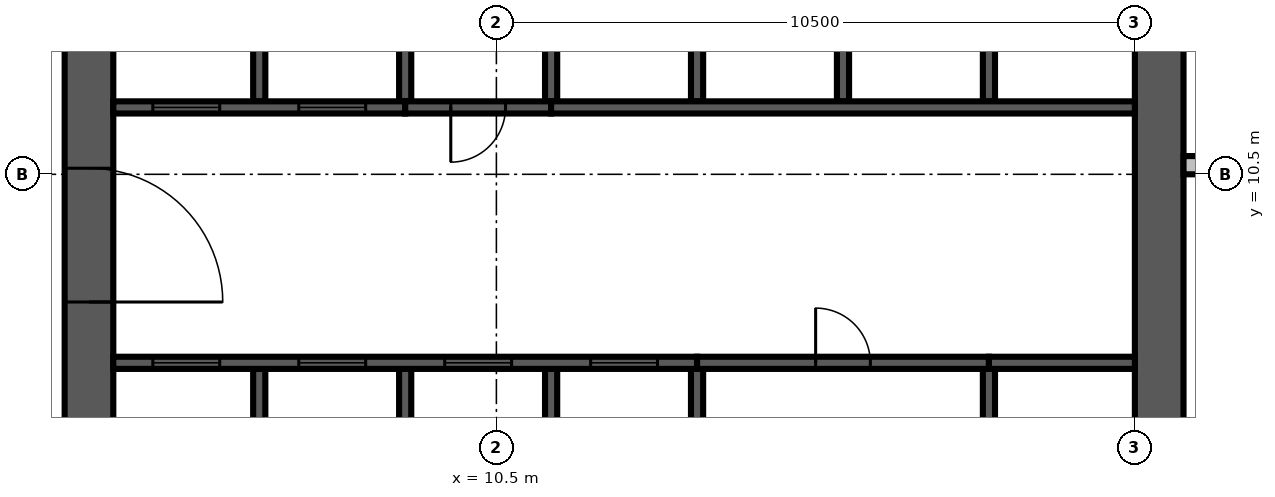
"""IFC4 building model, lengths in metres.
Left out: names, types, materials, properties, quantities, classifications, styles, units other than length and angle.
Written with IfcOpenShell. Run it as: python <this file> out.ifc"""

import sys

from ifc_helpers import new_model, si_unit, direction, frame, frame_2d, origin, place, context, subcontext, project, spatial, rectangle, extrude, source, transform, mapped, element, fill, save


model = new_model("IFC4")
c1 = context("Model", 3, precision=1e-05, world=origin(), true_north=direction((0.0, 1.0)))
c2 = subcontext(c1, "Body", "Model", "MODEL_VIEW")
j1 = project(units=[si_unit("LENGTHUNIT", "METRE"), si_unit("PLANEANGLEUNIT", "RADIAN")], contexts=[c1])
p1 = place(None, origin())
s1 = spatial("IfcSite", under=j1, at=p1, CompositionType="ELEMENT")
p2 = place(p1, origin())
s2 = spatial("IfcBuilding", under=s1, at=p2, CompositionType="ELEMENT")
p3 = place(p2, frame((0.0, 0.0, 212.0)))
s3 = spatial("IfcBuildingStorey", under=s2, at=p3, CompositionType="ELEMENT", Elevation=212.0)
m1 = source(origin(), c2, "Body", "SweptSolid", [
    extrude(rectangle(XDim=17.6, YDim=0.8, at=frame_2d((8.8, 0.0))), origin(), (0.0, 0.0, 1.0), 3.8),
])
p4 = place(p3, frame((3.8, 4.2, 0.0), z_axis=(0.0, 0.0, 1.0), x_axis=(0.0, 1.0, 0.0)))
e1 = element("IfcWall", 1, at=p4, inside=s3, PredefinedType="SHEAR", context=c2, shape_type="MappedRepresentation", body=[
    mapped(m1, transform((0.0, 0.0, 0.0), scale=1.0)),
])
m2 = source(origin(), c2, "Body", "SweptSolid", [
    extrude(rectangle(XDim=2.2, YDim=2.1, at=frame_2d((1.1, 1.05))), frame((0.0, 0.41, 0.0), z_axis=(0.0, -1.0, 0.0), x_axis=(1.0, 0.0, 0.0)), (0.0, 0.0, 1.0), 0.82),
])
p5 = place(p4, frame((4.2, 0.0, 0.0)))
e2 = element("IfcOpeningElement", 2, at=p5, cuts=e1, PredefinedType="OPENING", context=c2, shape_type="MappedRepresentation", body=[
    mapped(m2, transform((0.0, 0.0, 0.0), scale=1.0)),
])
m3 = source(origin(), c2, "Body", "SweptSolid", [
    extrude(rectangle(XDim=0.9, YDim=2.1, at=frame_2d((0.45, 1.05))), frame((0.0, 0.41, 0.0), z_axis=(0.0, -1.0, 0.0), x_axis=(1.0, 0.0, 0.0)), (0.0, 0.0, 1.0), 0.82),
])
p6 = place(p4, frame((10.95, 0.0, 0.0)))
e3 = element("IfcOpeningElement", 3, at=p6, cuts=e1, PredefinedType="OPENING", context=c2, shape_type="MappedRepresentation", body=[
    mapped(m3, transform((0.0, 0.0, 0.0), scale=1.0)),
])
m4 = source(origin(), c2, "Body", "SweptSolid", [
    extrude(rectangle(XDim=16.8, YDim=0.8, at=frame_2d((8.4, 0.0))), origin(), (0.0, 0.0, 1.0), 3.8),
])
p7 = place(p3, frame((21.4, 4.2, 0.0), z_axis=(0.0, 0.0, 1.0), x_axis=(0.0, 1.0, 0.0)))
e4 = element("IfcWall", 4, at=p7, inside=s3, PredefinedType="SHEAR", context=c2, shape_type="MappedRepresentation", body=[
    mapped(m4, transform((0.0, 0.0, 0.0), scale=1.0)),
])
m5 = source(origin(), c2, "Body", "SweptSolid", [
    extrude(rectangle(XDim=1.2, YDim=2.1, at=frame_2d((0.6, 1.05))), frame((0.0, 0.41, 0.0), z_axis=(0.0, -1.0, 0.0), x_axis=(1.0, 0.0, 0.0)), (0.0, 0.0, 1.0), 0.82),
])
p8 = place(p7, frame((14.7, 0.0, 0.0)))
e5 = element("IfcOpeningElement", 5, at=p8, cuts=e4, PredefinedType="OPENING", context=c2, shape_type="MappedRepresentation", body=[
    mapped(m5, transform((0.0, 0.0, 0.0), scale=1.0)),
])
m6 = source(origin(), c2, "Body", "SweptSolid", [
    extrude(rectangle(XDim=7.15, YDim=0.3, at=frame_2d((3.575, 0.0))), origin(), (0.0, 0.0, 1.0), 3.4),
])
p9 = place(p3, frame((21.8, 10.65, 0.0), z_axis=(0.0, 0.0, 1.0), x_axis=(1.0, 0.0, 0.0)))
e6 = element("IfcWall", 6, at=p9, inside=s3, PredefinedType="STANDARD", context=c2, shape_type="MappedRepresentation", body=[
    mapped(m6, transform((0.0, 0.0, 0.0), scale=1.0)),
])
m7 = source(origin(), c2, "Body", "SweptSolid", [
    extrude(rectangle(XDim=1.8, YDim=2.3, at=frame_2d((0.9, 1.15))), frame((0.0, 0.16, 0.0), z_axis=(0.0, -1.0, 0.0), x_axis=(1.0, 0.0, 0.0)), (0.0, 0.0, 1.0), 0.32),
])
p10 = place(p9, frame((0.4, 0.0, 0.6)))
e7 = element("IfcOpeningElement", 7, at=p10, cuts=e6, PredefinedType="OPENING", context=c2, shape_type="MappedRepresentation", body=[
    mapped(m7, transform((0.0, 0.0, 0.0), scale=1.0)),
])
m8 = source(origin(), c2, "Body", "SweptSolid", [
    extrude(rectangle(XDim=3.0, YDim=2.3, at=frame_2d((1.5, 1.15))), frame((0.0, 0.16, 0.0), z_axis=(0.0, -1.0, 0.0), x_axis=(1.0, 0.0, 0.0)), (0.0, 0.0, 1.0), 0.32),
])
p11 = place(p9, frame((4.0, 0.0, 0.6)))
e8 = element("IfcOpeningElement", 8, at=p11, cuts=e6, PredefinedType="OPENING", context=c2, shape_type="MappedRepresentation", body=[
    mapped(m8, transform((0.0, 0.0, 0.0), scale=1.0)),
])
m9 = source(origin(), c2, "Body", "SweptSolid", [
    extrude(rectangle(XDim=3.1, YDim=0.2, at=frame_2d((1.55, 0.0))), origin(), (0.0, 0.0, 1.0), 3.8),
])
for number, where, z_axis, x_axis in (
    (9, (6.6, 4.2, 0.0), (0.0, 0.0, 1.0), (0.0, 1.0, 0.0)),
    (10, (9.0, 4.2, 0.0), (0.0, 0.0, 1.0), (0.0, 1.0, 0.0)),
    (11, (11.4, 4.2, 0.0), (0.0, 0.0, 1.0), (0.0, 1.0, 0.0)),
):
    element("IfcWall", number, at=place(p3, frame(where, z_axis=z_axis, x_axis=x_axis)), inside=s3, PredefinedType="SOLIDWALL", context=c2, shape_type="MappedRepresentation", body=[
        mapped(m9, transform((0.0, 0.0, 0.0), scale=1.0)),
    ])
m10 = source(origin(), c2, "Body", "SweptSolid", [
    extrude(rectangle(XDim=3.1, YDim=0.2, at=frame_2d((1.55, 0.0))), origin(), (0.0, 0.0, 1.0), 3.4),
])
for number, where, z_axis, x_axis in (
    (12, (13.8, 4.2, 0.0), (0.0, 0.0, 1.0), (0.0, 1.0, 0.0)),
    (13, (18.6, 4.2, 0.0), (0.0, 0.0, 1.0), (0.0, 1.0, 0.0)),
):
    element("IfcWall", number, at=place(p3, frame(where, z_axis=z_axis, x_axis=x_axis)), inside=s3, PredefinedType="SOLIDWALL", context=c2, shape_type="MappedRepresentation", body=[
        mapped(m10, transform((0.0, 0.0, 0.0), scale=1.0)),
    ])
m11 = source(origin(), c2, "Body", "SweptSolid", [
    extrude(rectangle(XDim=3.0, YDim=0.2, at=frame_2d((1.5, 0.0))), origin(), (0.0, 0.0, 1.0), 3.8),
])
p12 = place(p3, frame((6.6, 11.7, 0.0), z_axis=(0.0, 0.0, 1.0), x_axis=(0.0, 1.0, 0.0)))
e14 = element("IfcWall", 14, at=p12, inside=s3, PredefinedType="SOLIDWALL", context=c2, shape_type="MappedRepresentation", body=[
    mapped(m11, transform((0.0, 0.0, 0.0), scale=1.0)),
])
m12 = source(origin(), c2, "Body", "SweptSolid", [
    extrude(rectangle(XDim=3.0, YDim=0.2, at=frame_2d((1.5, 0.0))), origin(), (0.0, 0.0, 1.0), 3.4),
])
for number, where, z_axis, x_axis in (
    (15, (9.0, 11.7, 0.0), (0.0, 0.0, 1.0), (0.0, 1.0, 0.0)),
    (16, (11.4, 11.7, 0.0), (0.0, 0.0, 1.0), (0.0, 1.0, 0.0)),
):
    element("IfcWall", number, at=place(p3, frame(where, z_axis=z_axis, x_axis=x_axis)), inside=s3, PredefinedType="SOLIDWALL", context=c2, shape_type="MappedRepresentation", body=[
        mapped(m12, transform((0.0, 0.0, 0.0), scale=1.0)),
    ])
for number, where, z_axis, x_axis in (
    (17, (13.8, 11.7, 0.0), (0.0, 0.0, 1.0), (0.0, 1.0, 0.0)),
    (18, (16.2, 11.7, 0.0), (0.0, 0.0, 1.0), (0.0, 1.0, 0.0)),
    (19, (18.6, 11.7, 0.0), (0.0, 0.0, 1.0), (0.0, 1.0, 0.0)),
):
    element("IfcWall", number, at=place(p3, frame(where, z_axis=z_axis, x_axis=x_axis)), inside=s3, PredefinedType="SOLIDWALL", context=c2, shape_type="MappedRepresentation", body=[
        mapped(m11, transform((0.0, 0.0, 0.0), scale=1.0)),
    ])
m13 = source(origin(), c2, "Body", "SweptSolid", [
    extrude(rectangle(XDim=9.6, YDim=0.2, at=frame_2d((4.8, 0.0))), origin(), (0.0, 0.0, 1.0), 3.8),
])
p13 = place(p3, frame((4.2, 7.4, 0.0), z_axis=(0.0, 0.0, 1.0), x_axis=(1.0, 0.0, 0.0)))
e20 = element("IfcWall", 20, at=p13, inside=s3, PredefinedType="SOLIDWALL", context=c2, shape_type="MappedRepresentation", body=[
    mapped(m13, transform((0.0, 0.0, 0.0), scale=1.0)),
])
m14 = source(origin(), c2, "Body", "SweptSolid", [
    extrude(rectangle(XDim=1.1, YDim=2.1, at=frame_2d((0.55, 1.05))), frame((0.0, 0.11, 0.0), z_axis=(0.0, -1.0, 0.0), x_axis=(1.0, 0.0, 0.0)), (0.0, 0.0, 1.0), 0.22),
])
p14 = place(p13, frame((0.65, 0.0, 0.0)))
e21 = element("IfcOpeningElement", 21, at=p14, cuts=e20, PredefinedType="OPENING", context=c2, shape_type="MappedRepresentation", body=[
    mapped(m14, transform((0.0, 0.0, 0.0), scale=1.0)),
])
p15 = place(p13, frame((3.05, 0.0, 0.0)))
e22 = element("IfcOpeningElement", 22, at=p15, cuts=e20, PredefinedType="OPENING", context=c2, shape_type="MappedRepresentation", body=[
    mapped(m14, transform((0.0, 0.0, 0.0), scale=1.0)),
])
p16 = place(p13, frame((5.45, 0.0, 0.0)))
e23 = element("IfcOpeningElement", 23, at=p16, cuts=e20, PredefinedType="OPENING", context=c2, shape_type="MappedRepresentation", body=[
    mapped(m14, transform((0.0, 0.0, 0.0), scale=1.0)),
])
p17 = place(p13, frame((7.85, 0.0, 0.0)))
e24 = element("IfcOpeningElement", 24, at=p17, cuts=e20, PredefinedType="OPENING", context=c2, shape_type="MappedRepresentation", body=[
    mapped(m14, transform((0.0, 0.0, 0.0), scale=1.0)),
])
m15 = source(origin(), c2, "Body", "SweptSolid", [
    extrude(rectangle(XDim=4.8, YDim=0.2, at=frame_2d((2.4, 0.0))), origin(), (0.0, 0.0, 1.0), 3.4),
])
p18 = place(p3, frame((13.8, 7.4, 0.0), z_axis=(0.0, 0.0, 1.0), x_axis=(1.0, 0.0, 0.0)))
e25 = element("IfcWall", 25, at=p18, inside=s3, PredefinedType="SOLIDWALL", context=c2, shape_type="MappedRepresentation", body=[
    mapped(m15, transform((0.0, 0.0, 0.0), scale=1.0)),
])
m16 = source(origin(), c2, "Body", "SweptSolid", [
    extrude(rectangle(XDim=0.9, YDim=2.1, at=frame_2d((0.45, 1.05))), frame((0.0, 0.11, 0.0), z_axis=(0.0, -1.0, 0.0), x_axis=(1.0, 0.0, 0.0)), (0.0, 0.0, 1.0), 0.22),
])
p19 = place(p18, frame((1.95, 0.0, 0.0)))
e26 = element("IfcOpeningElement", 26, at=p19, cuts=e25, PredefinedType="OPENING", context=c2, shape_type="MappedRepresentation", body=[
    mapped(m16, transform((0.0, 0.0, 0.0), scale=1.0)),
])
m17 = source(origin(), c2, "Body", "SweptSolid", [
    extrude(rectangle(XDim=2.4, YDim=0.2, at=frame_2d((1.2, 0.0))), origin(), (0.0, 0.0, 1.0), 3.8),
])
p20 = place(p3, frame((18.6, 7.4, 0.0), z_axis=(0.0, 0.0, 1.0), x_axis=(1.0, 0.0, 0.0)))
e27 = element("IfcWall", 27, at=p20, inside=s3, PredefinedType="SOLIDWALL", context=c2, shape_type="MappedRepresentation", body=[
    mapped(m17, transform((0.0, 0.0, 0.0), scale=1.0)),
])
m18 = source(origin(), c2, "Body", "SweptSolid", [
    extrude(rectangle(XDim=4.8, YDim=0.2, at=frame_2d((2.4, 0.0))), origin(), (0.0, 0.0, 1.0), 3.8),
])
p21 = place(p3, frame((4.2, 11.6, 0.0), z_axis=(0.0, 0.0, 1.0), x_axis=(1.0, 0.0, 0.0)))
e28 = element("IfcWall", 28, at=p21, inside=s3, PredefinedType="SOLIDWALL", context=c2, shape_type="MappedRepresentation", body=[
    mapped(m18, transform((0.0, 0.0, 0.0), scale=1.0)),
])
p22 = place(p21, frame((0.65, 0.0, 0.0)))
e29 = element("IfcOpeningElement", 29, at=p22, cuts=e28, PredefinedType="OPENING", context=c2, shape_type="MappedRepresentation", body=[
    mapped(m14, transform((0.0, 0.0, 0.0), scale=1.0)),
])
p23 = place(p21, frame((3.05, 0.0, 0.0)))
e30 = element("IfcOpeningElement", 30, at=p23, cuts=e28, PredefinedType="OPENING", context=c2, shape_type="MappedRepresentation", body=[
    mapped(m14, transform((0.0, 0.0, 0.0), scale=1.0)),
])
m19 = source(origin(), c2, "Body", "SweptSolid", [
    extrude(rectangle(XDim=2.4, YDim=0.2, at=frame_2d((1.2, 0.0))), origin(), (0.0, 0.0, 1.0), 3.4),
])
p24 = place(p3, frame((9.0, 11.6, 0.0), z_axis=(0.0, 0.0, 1.0), x_axis=(1.0, 0.0, 0.0)))
e31 = element("IfcWall", 31, at=p24, inside=s3, PredefinedType="SOLIDWALL", context=c2, shape_type="MappedRepresentation", body=[
    mapped(m19, transform((0.0, 0.0, 0.0), scale=1.0)),
])
p25 = place(p24, frame((0.75, 0.0, 0.0)))
e32 = element("IfcOpeningElement", 32, at=p25, cuts=e31, PredefinedType="OPENING", context=c2, shape_type="MappedRepresentation", body=[
    mapped(m16, transform((0.0, 0.0, 0.0), scale=1.0)),
])
p26 = place(p3, frame((11.4, 11.6, 0.0), z_axis=(0.0, 0.0, 1.0), x_axis=(1.0, 0.0, 0.0)))
e33 = element("IfcWall", 33, at=p26, inside=s3, PredefinedType="SOLIDWALL", context=c2, shape_type="MappedRepresentation", body=[
    mapped(m13, transform((0.0, 0.0, 0.0), scale=1.0)),
])
m20 = source(origin(), c2, "Body", "SweptSolid", [
    extrude(rectangle(XDim=1.1, YDim=2.1, at=frame_2d((0.55, 1.05))), frame((0.0, 0.025, 0.0), z_axis=(0.0, -1.0, 0.0), x_axis=(1.0, 0.0, 0.0)), (0.0, 0.0, 1.0), 0.05),
])
p27 = place(p14, origin())
e34 = element("IfcDoor", 34, at=p27, inside=s3, OperationType="SLIDING_TO_LEFT", PredefinedType="DOOR", context=c2, shape_type="MappedRepresentation", body=[
    mapped(m20, transform((0.0, 0.0, 0.0), scale=1.0)),
])
fill(e21, e34)
p28 = place(p15, origin())
e35 = element("IfcDoor", 35, at=p28, inside=s3, OperationType="SLIDING_TO_LEFT", PredefinedType="DOOR", context=c2, shape_type="MappedRepresentation", body=[
    mapped(m20, transform((0.0, 0.0, 0.0), scale=1.0)),
])
fill(e22, e35)
p29 = place(p16, origin())
e36 = element("IfcDoor", 36, at=p29, inside=s3, OperationType="SLIDING_TO_LEFT", PredefinedType="DOOR", context=c2, shape_type="MappedRepresentation", body=[
    mapped(m20, transform((0.0, 0.0, 0.0), scale=1.0)),
])
fill(e23, e36)
p30 = place(p17, origin())
e37 = element("IfcDoor", 37, at=p30, inside=s3, OperationType="SLIDING_TO_LEFT", PredefinedType="DOOR", context=c2, shape_type="MappedRepresentation", body=[
    mapped(m20, transform((0.0, 0.0, 0.0), scale=1.0)),
])
fill(e24, e37)
m21 = source(origin(), c2, "Body", "SweptSolid", [
    extrude(rectangle(XDim=0.9, YDim=2.1, at=frame_2d((0.45, 1.05))), frame((0.0, 0.025, 0.0), z_axis=(0.0, -1.0, 0.0), x_axis=(1.0, 0.0, 0.0)), (0.0, 0.0, 1.0), 0.05),
])
p31 = place(p19, origin())
e38 = element("IfcDoor", 38, at=p31, inside=s3, OperationType="SINGLE_SWING_LEFT", PredefinedType="DOOR", context=c2, shape_type="MappedRepresentation", body=[
    mapped(m21, transform((0.0, 0.0, 0.0), scale=1.0)),
])
fill(e26, e38)
p32 = place(p22, origin())
e39 = element("IfcDoor", 39, at=p32, inside=s3, OperationType="SLIDING_TO_LEFT", PredefinedType="DOOR", context=c2, shape_type="MappedRepresentation", body=[
    mapped(m20, transform((0.0, 0.0, 0.0), scale=1.0)),
])
fill(e29, e39)
p33 = place(p23, origin())
e40 = element("IfcDoor", 40, at=p33, inside=s3, OperationType="SLIDING_TO_LEFT", PredefinedType="DOOR", context=c2, shape_type="MappedRepresentation", body=[
    mapped(m20, transform((0.0, 0.0, 0.0), scale=1.0)),
])
fill(e30, e40)
p34 = place(p25, origin())
e41 = element("IfcDoor", 41, at=p34, inside=s3, OperationType="SINGLE_SWING_RIGHT", PredefinedType="DOOR", context=c2, shape_type="MappedRepresentation", body=[
    mapped(m21, transform((0.0, 0.0, 0.0), scale=1.0)),
])
fill(e32, e41)
m22 = source(origin(), c2, "Body", "SweptSolid", [
    extrude(rectangle(XDim=2.2, YDim=2.1, at=frame_2d((1.1, 1.05))), frame((0.0, 0.025, 0.0), z_axis=(0.0, -1.0, 0.0), x_axis=(1.0, 0.0, 0.0)), (0.0, 0.0, 1.0), 0.05),
])
p35 = place(p5, origin())
e42 = element("IfcDoor", 42, at=p35, inside=s3, OperationType="DOUBLE_DOOR_SINGLE_SWING", PredefinedType="DOOR", context=c2, shape_type="MappedRepresentation", body=[
    mapped(m22, transform((0.0, 0.0, 0.0), scale=1.0)),
])
fill(e2, e42)
save(model, sys.argv[1])
